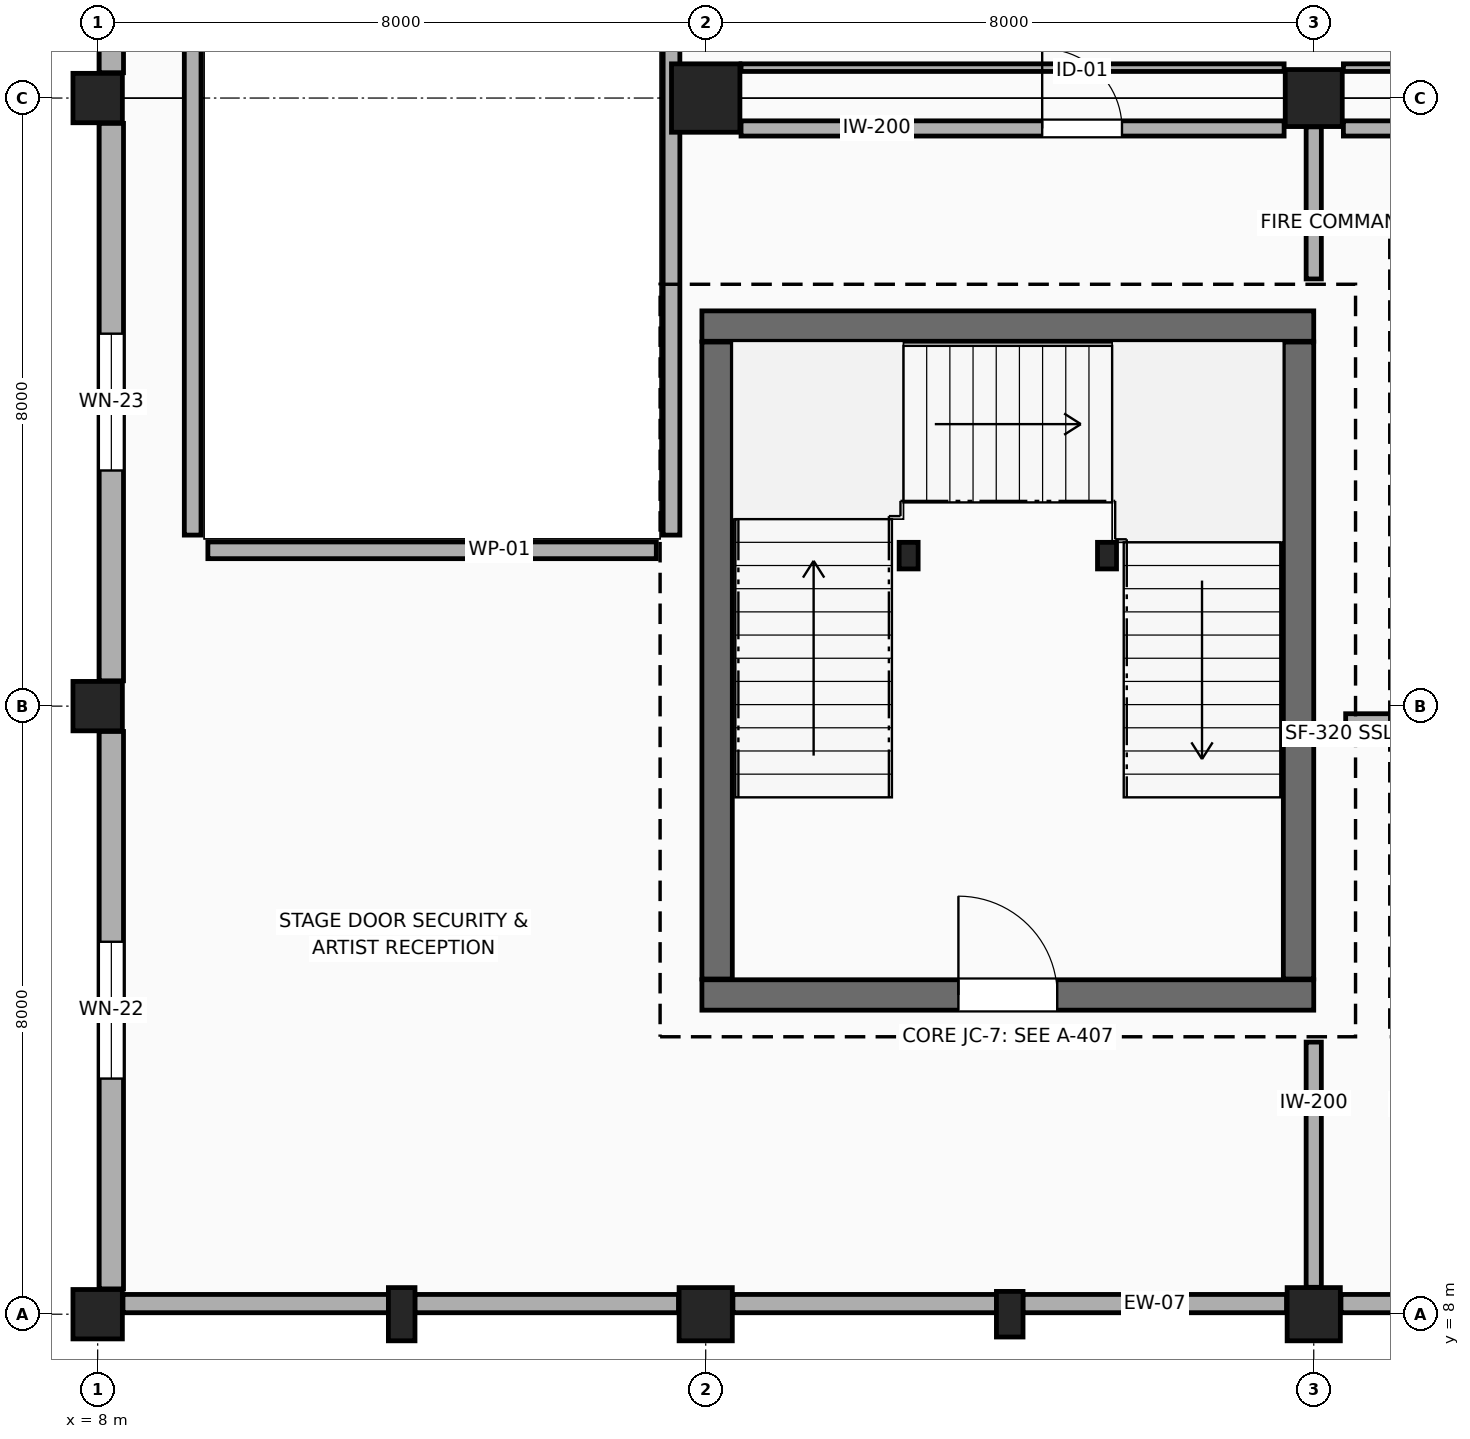
"""IFC4 building model, lengths in metres.
Left out: names, types, materials, properties, quantities, classifications, styles, units other than length and angle.
Written with IfcOpenShell. Run it as: python <this file> out.ifc"""

import sys

from ifc_helpers import new_model, si_unit, direction, frame, frame_2d, origin, origin_2d, place, context, subcontext, project, spatial, rectangle, circle, i_section, extrude, element, fill, save


model = new_model("IFC4")
c1 = context("Model", 3, precision=1e-05, world=origin(), true_north=direction((0.0, 1.0)))
c2 = subcontext(c1, "Body", "Model", "MODEL_VIEW")
j1 = project(units=[si_unit("LENGTHUNIT", "METRE"), si_unit("PLANEANGLEUNIT", "RADIAN")], contexts=[c1])
p1 = place(None, origin())
s1 = spatial("IfcSite", under=j1, at=p1, CompositionType="ELEMENT")
p2 = place(p1, origin())
s2 = spatial("IfcBuilding", under=s1, at=p2, CompositionType="ELEMENT")
p3 = place(p2, origin())
s3 = spatial("IfcBuildingStorey", under=s2, at=p3, CompositionType="ELEMENT", Elevation=0.0)
for number, where, z_axis, x_axis in (
    (1, (8.0, 8.0, 0.0), (0.0, 0.0, 1.0), (1.0, 0.0, 0.0)),
    (2, (8.0, 16.0, 0.0), (0.0, 0.0, 1.0), (1.0, 0.0, 0.0)),
    (3, (8.0, 24.0, 0.0), (0.0, 0.0, 1.0), (1.0, 0.0, 0.0)),
):
    element("IfcColumn", number, at=place(p3, frame(where, z_axis=z_axis, x_axis=x_axis)), inside=s3, PredefinedType="COLUMN", context=c2, shape_type="SweptSolid", body=[
        extrude(rectangle(XDim=0.65, YDim=0.65, at=origin_2d()), origin(), (0.0, 0.0, 1.0), 5.36),
    ])
p4 = place(p3, frame((16.0, 8.0, 0.0), z_axis=(0.0, 0.0, 1.0), x_axis=(1.0, 0.0, 0.0)))
e4 = element("IfcColumn", 4, at=p4, inside=s3, PredefinedType="COLUMN", context=c2, shape_type="SweptSolid", body=[
    extrude(circle(Radius=0.35, at=origin_2d()), origin(), (0.0, 0.0, 1.0), 5.4),
])
p5 = place(p3, frame((16.0, 24.0, 0.0), z_axis=(0.0, 0.0, 1.0), x_axis=(1.0, 0.0, 0.0)))
e5 = element("IfcColumn", 5, at=p5, inside=s3, PredefinedType="COLUMN", context=c2, shape_type="SweptSolid", body=[
    extrude(rectangle(XDim=0.9, YDim=0.9, at=origin_2d()), origin(), (0.0, 0.0, 1.0), 5.4),
])
p6 = place(p3, frame((24.0, 8.0, 0.0), z_axis=(0.0, 0.0, 1.0), x_axis=(1.0, 0.0, 0.0)))
e6 = element("IfcColumn", 6, at=p6, inside=s3, PredefinedType="COLUMN", context=c2, shape_type="SweptSolid", body=[
    extrude(circle(Radius=0.35, at=origin_2d()), origin(), (0.0, 0.0, 1.0), 5.4),
])
p7 = place(p3, frame((24.0, 24.0, 0.0), z_axis=(0.0, 0.0, 1.0), x_axis=(1.0, 0.0, 0.0)))
e7 = element("IfcColumn", 7, at=p7, inside=s3, PredefinedType="COLUMN", context=c2, shape_type="SweptSolid", body=[
    extrude(rectangle(XDim=0.75, YDim=0.75, at=origin_2d()), origin(), (0.0, 0.0, 1.0), 5.4),
])
for number, where, z_axis, x_axis in (
    (8, (18.67, 17.98, 0.0), (0.0, 0.0, 1.0), (1.0, 0.0, 0.0)),
    (9, (21.28, 17.98, 0.0), (0.0, 0.0, 1.0), (1.0, 0.0, 0.0)),
):
    element("IfcColumn", number, at=place(p3, frame(where, z_axis=z_axis, x_axis=x_axis)), inside=s3, PredefinedType="COLUMN", context=c2, shape_type="SweptSolid", body=[
        extrude(i_section(OverallWidth=0.25, OverallDepth=0.35, WebThickness=0.01, FlangeThickness=0.012, FilletRadius=0.012, at=origin_2d()), origin(), (0.0, 0.0, 1.0), 5.4),
    ])
p8 = place(p3, frame((12.0, 8.0, 0.0), z_axis=(0.0, 0.0, 1.0), x_axis=(1.0, 0.0, 0.0)))
e10 = element("IfcColumn", 10, at=p8, inside=s3, PredefinedType="PILASTER", context=c2, shape_type="SweptSolid", body=[
    extrude(rectangle(XDim=0.35, YDim=0.7, at=origin_2d()), origin(), (0.0, 0.0, 1.0), 5.4),
])
p9 = place(p3, frame((20.0, 8.0, 0.0), z_axis=(0.0, 0.0, 1.0), x_axis=(1.0, 0.0, 0.0)))
e11 = element("IfcColumn", 11, at=p9, inside=s3, PredefinedType="PILASTER", context=c2, shape_type="SweptSolid", body=[
    extrude(rectangle(XDim=0.35, YDim=0.6, at=origin_2d()), origin(), (0.0, 0.0, 1.0), 5.4),
])
p10 = place(p3, frame((27.828, 8.14, 0.0), z_axis=(0.0, 0.0, 1.0), x_axis=(-1.0, 0.0, 0.0)))
e12 = element("IfcWall", 12, at=p10, inside=s3, PredefinedType="ELEMENTEDWALL", context=c2, shape_type="SweptSolid", body=[
    extrude(rectangle(XDim=3.47, YDim=0.24, at=frame_2d((1.735, 0.0))), origin(), (0.0, 0.0, 1.0), 4.555),
])
for number, where, z_axis, x_axis in (
    (13, (23.642, 8.14, 0.0), (0.0, 0.0, 1.0), (-1.0, 0.0, 0.0)),
    (14, (19.828, 8.14, 0.0), (0.0, 0.0, 1.0), (-1.0, 0.0, 0.0)),
):
    element("IfcWall", number, at=place(p3, frame(where, z_axis=z_axis, x_axis=x_axis)), inside=s3, PredefinedType="ELEMENTEDWALL", context=c2, shape_type="SweptSolid", body=[
        extrude(rectangle(XDim=3.47, YDim=0.24, at=frame_2d((1.735, 0.0))), origin(), (0.0, 0.0, 1.0), 4.505),
    ])
p11 = place(p3, frame((15.642, 8.14, 0.0), z_axis=(0.0, 0.0, 1.0), x_axis=(-1.0, 0.0, 0.0)))
e15 = element("IfcWall", 15, at=p11, inside=s3, PredefinedType="ELEMENTEDWALL", context=c2, shape_type="SweptSolid", body=[
    extrude(rectangle(XDim=3.47, YDim=0.24, at=frame_2d((1.735, 0.0))), origin(), (0.0, 0.0, 1.0), 4.805),
])
p12 = place(p3, frame((11.828, 8.14, 0.0), z_axis=(0.0, 0.0, 1.0), x_axis=(-1.0, 0.0, 0.0)))
e16 = element("IfcWall", 16, at=p12, inside=s3, PredefinedType="ELEMENTEDWALL", context=c2, shape_type="SweptSolid", body=[
    extrude(rectangle(XDim=3.495, YDim=0.24, at=frame_2d((1.748, 0.0))), origin(), (0.0, 0.0, 1.0), 4.805),
])
p13 = place(p3, frame((8.18, 8.333, 0.0), z_axis=(0.0, 0.0, 1.0), x_axis=(0.0, 1.0, 0.0)))
e17 = element("IfcWall", 17, at=p13, inside=s3, PredefinedType="STANDARD", context=c2, shape_type="SweptSolid", body=[
    extrude(rectangle(XDim=7.334, YDim=0.32, at=frame_2d((3.667, 0.0))), origin(), (0.0, 0.0, 1.0), 4.705),
])
p14 = place(p13, frame((2.767, 0.0, 0.95)))
e18 = element("IfcOpeningElement", 18, at=p14, cuts=e17, PredefinedType="OPENING", context=c2, shape_type="SweptSolid", body=[
    extrude(rectangle(XDim=1.8, YDim=1.5, at=frame_2d((0.9, 0.75))), frame((0.0, 0.17, 0.0), z_axis=(0.0, -1.0, 0.0), x_axis=(1.0, 0.0, 0.0)), (0.0, 0.0, 1.0), 0.34),
])
p15 = place(p3, frame((8.18, 16.333, 0.0), z_axis=(0.0, 0.0, 1.0), x_axis=(0.0, 1.0, 0.0)))
e19 = element("IfcWall", 19, at=p15, inside=s3, PredefinedType="STANDARD", context=c2, shape_type="SweptSolid", body=[
    extrude(rectangle(XDim=7.334, YDim=0.32, at=frame_2d((3.667, 0.0))), origin(), (0.0, 0.0, 1.0), 4.755),
])
p16 = place(p15, frame((2.767, 0.0, 0.95)))
e20 = element("IfcOpeningElement", 20, at=p16, cuts=e19, PredefinedType="OPENING", context=c2, shape_type="SweptSolid", body=[
    extrude(rectangle(XDim=1.8, YDim=1.8, at=frame_2d((0.9, 0.9))), frame((0.0, 0.17, 0.0), z_axis=(0.0, -1.0, 0.0), x_axis=(1.0, 0.0, 0.0)), (0.0, 0.0, 1.0), 0.34),
])
p17 = place(p3, frame((8.18, 24.333, 0.0), z_axis=(0.0, 0.0, 1.0), x_axis=(0.0, 1.0, 0.0)))
e21 = element("IfcWall", 21, at=p17, inside=s3, PredefinedType="STANDARD", context=c2, shape_type="SweptSolid", body=[
    extrude(rectangle(XDim=7.334, YDim=0.32, at=frame_2d((3.667, 0.0))), origin(), (0.0, 0.0, 1.0), 4.805),
])
p18 = place(p17, frame((2.767, 0.0, 0.95)))
e22 = element("IfcOpeningElement", 22, at=p18, cuts=e21, PredefinedType="OPENING", context=c2, shape_type="SweptSolid", body=[
    extrude(rectangle(XDim=1.8, YDim=2.1, at=frame_2d((0.9, 1.05))), frame((0.0, 0.17, 0.0), z_axis=(0.0, -1.0, 0.0), x_axis=(1.0, 0.0, 0.0)), (0.0, 0.0, 1.0), 0.34),
])
for number, where, z_axis, x_axis in (
    (23, (9.25, 18.25, 0.0), (0.0, 0.0, 1.0), (0.0, 1.0, 0.0)),
    (24, (15.55, 18.25, 0.0), (0.0, 0.0, 1.0), (0.0, 1.0, 0.0)),
):
    element("IfcWall", number, at=place(p3, frame(where, z_axis=z_axis, x_axis=x_axis)), inside=s3, PredefinedType="PARAPET", context=c2, shape_type="SweptSolid", body=[
        extrude(rectangle(XDim=38.2, YDim=0.22, at=frame_2d((19.1, 0.0))), origin(), (0.0, 0.0, 1.0), 1.25),
    ])
p19 = place(p3, frame((9.45, 18.05, 0.0), z_axis=(0.0, 0.0, 1.0), x_axis=(1.0, 0.0, 0.0)))
e25 = element("IfcWall", 25, at=p19, inside=s3, PredefinedType="PARAPET", context=c2, shape_type="SweptSolid", body=[
    extrude(rectangle(XDim=5.9, YDim=0.22, at=frame_2d((2.95, 0.0))), origin(), (0.0, 0.0, 1.0), 1.25),
])
p20 = place(p3, frame((15.95, 12.2, 0.0), z_axis=(0.0, 0.0, 1.0), x_axis=(1.0, 0.0, 0.0)))
e26 = element("IfcWall", 26, at=p20, inside=s3, PredefinedType="SHEAR", context=c2, shape_type="SweptSolid", body=[
    extrude(rectangle(XDim=8.05, YDim=0.4, at=frame_2d((4.025, 0.0))), origin(), (0.0, 0.0, 1.0), 5.12),
])
p21 = place(p20, frame((3.375, 0.0, 0.0)))
e27 = element("IfcOpeningElement", 27, at=p21, cuts=e26, PredefinedType="OPENING", context=c2, shape_type="SweptSolid", body=[
    extrude(rectangle(XDim=1.3, YDim=2.15, at=frame_2d((0.65, 1.075))), frame((0.0, 0.21, 0.0), z_axis=(0.0, -1.0, 0.0), x_axis=(1.0, 0.0, 0.0)), (0.0, 0.0, 1.0), 0.42),
])
p22 = place(p3, frame((24.0, 21.0, 0.0), z_axis=(0.0, 0.0, 1.0), x_axis=(-1.0, 0.0, 0.0)))
e28 = element("IfcWall", 28, at=p22, inside=s3, PredefinedType="SHEAR", context=c2, shape_type="SweptSolid", body=[
    extrude(rectangle(XDim=8.05, YDim=0.4, at=frame_2d((4.025, 0.0))), origin(), (0.0, 0.0, 1.0), 5.12),
])
for number, where, z_axis, x_axis in (
    (29, (23.8, 12.41, 0.0), (0.0, 0.0, 1.0), (0.0, 1.0, 0.0)),
    (30, (16.15, 20.79, 0.0), (0.0, 0.0, 1.0), (0.0, -1.0, 0.0)),
):
    element("IfcWall", number, at=place(p3, frame(where, z_axis=z_axis, x_axis=x_axis)), inside=s3, PredefinedType="SHEAR", context=c2, shape_type="SweptSolid", body=[
        extrude(rectangle(XDim=8.38, YDim=0.4, at=frame_2d((4.19, 0.0))), origin(), (0.0, 0.0, 1.0), 5.12),
    ])
p23 = place(p3, frame((24.0, 11.58, 0.0), z_axis=(0.0, 0.0, 1.0), x_axis=(0.0, -1.0, 0.0)))
e31 = element("IfcWall", 31, at=p23, inside=s3, PredefinedType="PARTITIONING", context=c2, shape_type="SweptSolid", body=[
    extrude(rectangle(XDim=3.226, YDim=0.2, at=frame_2d((1.613, 0.0))), origin(), (0.0, 0.0, 1.0), 5.11),
])
p24 = place(p3, frame((16.465, 23.6, 0.0), z_axis=(0.0, 0.0, 1.0), x_axis=(1.0, 0.0, 0.0)))
e32 = element("IfcWall", 32, at=p24, inside=s3, PredefinedType="PARTITIONING", context=c2, shape_type="SweptSolid", body=[
    extrude(rectangle(XDim=7.145, YDim=0.2, at=frame_2d((3.573, 0.0))), origin(), (0.0, 0.0, 1.0), 5.11),
])
p25 = place(p24, frame((3.962, 0.0, 0.0)))
e33 = element("IfcOpeningElement", 33, at=p25, cuts=e32, PredefinedType="OPENING", context=c2, shape_type="SweptSolid", body=[
    extrude(rectangle(XDim=1.05, YDim=2.15, at=frame_2d((0.525, 1.075))), frame((0.0, 0.11, 0.0), z_axis=(0.0, -1.0, 0.0), x_axis=(1.0, 0.0, 0.0)), (0.0, 0.0, 1.0), 0.22),
])
p26 = place(p3, frame((24.0, 23.621, 0.0), z_axis=(0.0, 0.0, 1.0), x_axis=(0.0, -1.0, 0.0)))
e34 = element("IfcWall", 34, at=p26, inside=s3, PredefinedType="PARTITIONING", context=c2, shape_type="SweptSolid", body=[
    extrude(rectangle(XDim=2.001, YDim=0.2, at=frame_2d((1.0, 0.0))), origin(), (0.0, 0.0, 1.0), 5.11),
])
p27 = place(p3, frame((24.42, 15.8, 0.0), z_axis=(0.0, 0.0, 1.0), x_axis=(1.0, 0.0, 0.0)))
e35 = element("IfcWall", 35, at=p27, inside=s3, PredefinedType="PARTITIONING", context=c2, shape_type="SweptSolid", body=[
    extrude(rectangle(XDim=1.84, YDim=0.2, at=frame_2d((0.92, 0.0))), origin(), (0.0, 0.0, 1.0), 5.11),
])
p28 = place(p3, frame((24.39, 23.6, 0.0), z_axis=(0.0, 0.0, 1.0), x_axis=(1.0, 0.0, 0.0)))
e36 = element("IfcWall", 36, at=p28, inside=s3, PredefinedType="PARTITIONING", context=c2, shape_type="SweptSolid", body=[
    extrude(rectangle(XDim=5.69, YDim=0.2, at=frame_2d((2.845, 0.0))), origin(), (0.0, 0.0, 1.0), 5.11),
])
p29 = place(p3, frame((30.13, 24.4, 0.0), z_axis=(0.0, 0.0, 1.0), x_axis=(-1.0, 0.0, 0.0)))
e37 = element("IfcWall", 37, at=p29, inside=s3, PredefinedType="PARTITIONING", context=c2, shape_type="SweptSolid", body=[
    extrude(rectangle(XDim=5.74, YDim=0.1, at=frame_2d((2.87, 0.0))), origin(), (0.0, 0.0, 1.0), 5.11),
])
p30 = place(p3, frame((23.61, 24.4, 0.0), z_axis=(0.0, 0.0, 1.0), x_axis=(-1.0, 0.0, 0.0)))
e38 = element("IfcWall", 38, at=p30, inside=s3, PredefinedType="PARTITIONING", context=c2, shape_type="SweptSolid", body=[
    extrude(rectangle(XDim=7.145, YDim=0.1, at=frame_2d((3.573, 0.0))), origin(), (0.0, 0.0, 1.0), 5.11),
])
p31 = place(p14, origin())
e39 = element("IfcWindow", 39, at=p31, inside=s3, PartitioningType="SINGLE_PANEL", PredefinedType="WINDOW", context=c2, shape_type="SweptSolid", body=[
    extrude(rectangle(XDim=1.8, YDim=1.5, at=frame_2d((0.9, 0.75))), frame((0.0, 0.03, 0.0), z_axis=(0.0, -1.0, 0.0), x_axis=(1.0, 0.0, 0.0)), (0.0, 0.0, 1.0), 0.06),
])
fill(e18, e39)
p32 = place(p16, origin())
e40 = element("IfcWindow", 40, at=p32, inside=s3, PartitioningType="SINGLE_PANEL", PredefinedType="WINDOW", context=c2, shape_type="SweptSolid", body=[
    extrude(rectangle(XDim=1.8, YDim=1.8, at=frame_2d((0.9, 0.9))), frame((0.0, 0.03, 0.0), z_axis=(0.0, -1.0, 0.0), x_axis=(1.0, 0.0, 0.0)), (0.0, 0.0, 1.0), 0.06),
])
fill(e20, e40)
p33 = place(p21, origin())
e41 = element("IfcDoor", 41, at=p33, inside=s3, OperationType="SINGLE_SWING_LEFT", PredefinedType="DOOR", context=c2, shape_type="SweptSolid", body=[
    extrude(rectangle(XDim=1.3, YDim=2.15, at=frame_2d((0.65, 1.075))), frame((0.0, 0.025, 0.0), z_axis=(0.0, -1.0, 0.0), x_axis=(1.0, 0.0, 0.0)), (0.0, 0.0, 1.0), 0.05),
])
fill(e27, e41)
p34 = place(p25, origin())
e42 = element("IfcDoor", 42, at=p34, inside=s3, OperationType="SINGLE_SWING_LEFT", PredefinedType="DOOR", context=c2, shape_type="SweptSolid", body=[
    extrude(rectangle(XDim=1.05, YDim=2.15, at=frame_2d((0.525, 1.075))), frame((0.0, 0.025, 0.0), z_axis=(0.0, -1.0, 0.0), x_axis=(1.0, 0.0, 0.0)), (0.0, 0.0, 1.0), 0.05),
])
fill(e33, e42)
save(model, sys.argv[1])
